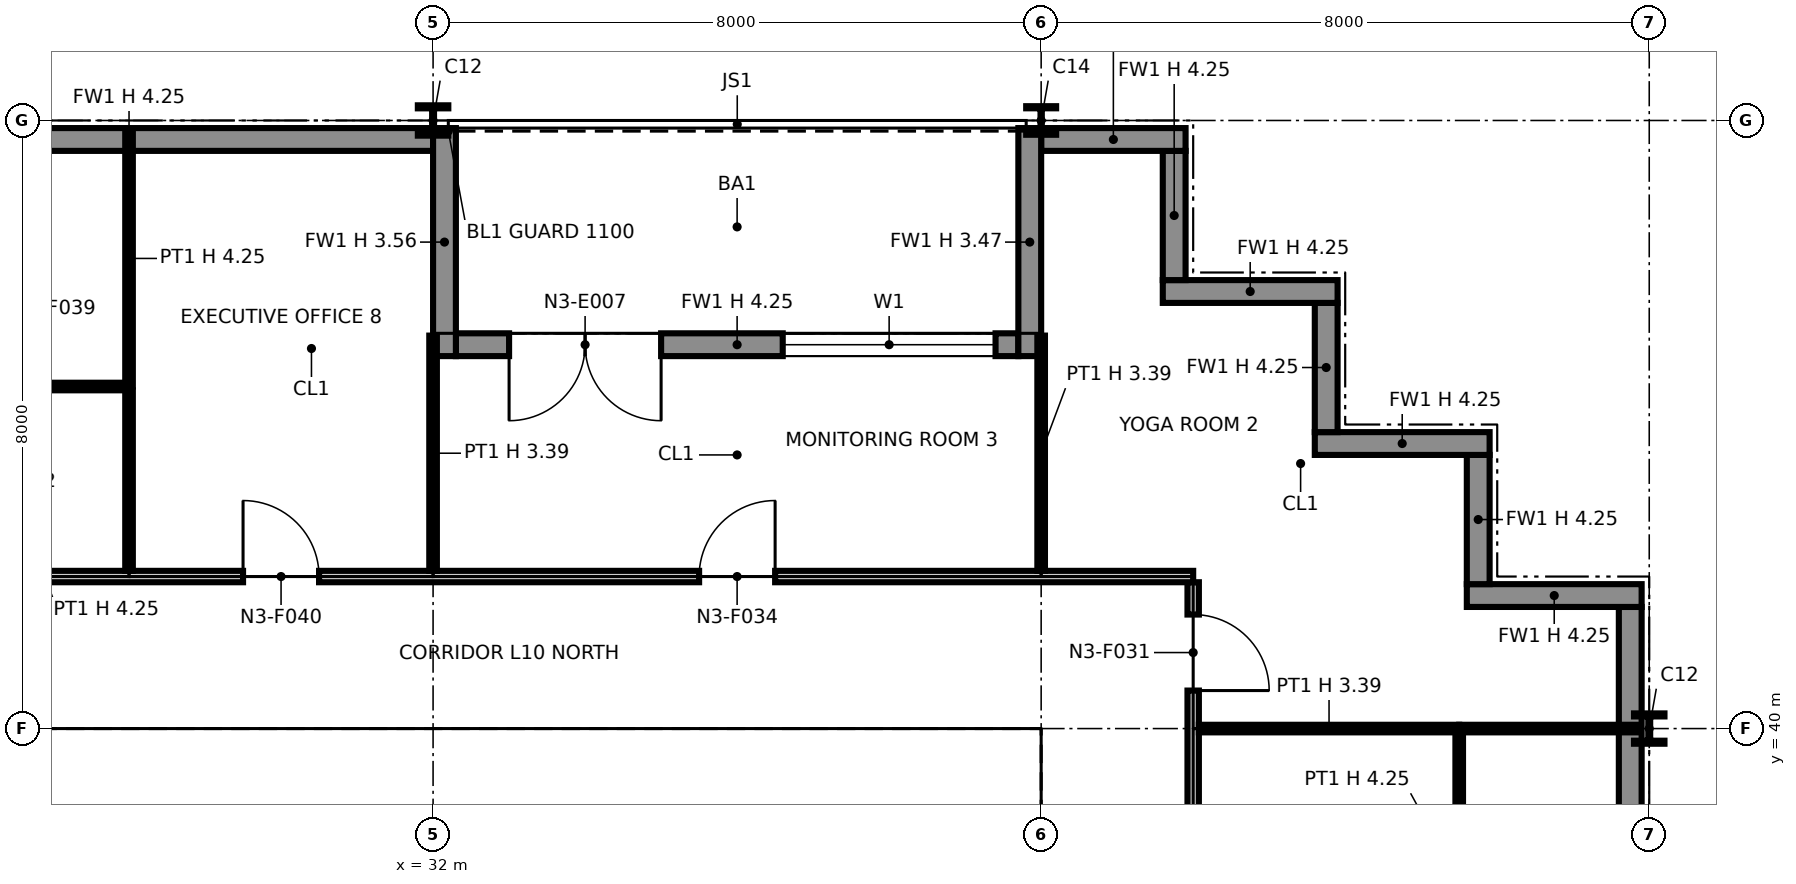
"""IFC4 building model, lengths in metres.
Left out: names, types, materials, properties, quantities, classifications, styles, units other than length and angle.
Written with IfcOpenShell. Run it as: python <this file> out.ifc"""

import sys

from ifc_helpers import new_model, si_unit, direction, frame, frame_2d, origin, origin_2d, place, context, subcontext, project, spatial, polyline, rectangle, i_section, outline, extrude, element, fill, save


model = new_model("IFC4")
c1 = context("Model", 3, precision=1e-05, world=origin(), true_north=direction((0.0, 1.0)))
c2 = subcontext(c1, "Body", "Model", "MODEL_VIEW")
j1 = project(units=[si_unit("LENGTHUNIT", "METRE"), si_unit("PLANEANGLEUNIT", "RADIAN")], contexts=[c1])
p1 = place(None, origin())
s1 = spatial("IfcSite", under=j1, at=p1, CompositionType="ELEMENT")
p2 = place(p1, origin())
s2 = spatial("IfcBuilding", under=s1, at=p2, CompositionType="ELEMENT")
p3 = place(p2, frame((0.0, 0.0, 61.2)))
s3 = spatial("IfcBuildingStorey", under=s2, at=p3, CompositionType="ELEMENT", Elevation=61.2)
p4 = place(p3, frame((32.0, 40.0, 0.0), z_axis=(0.0, 0.0, 1.0), x_axis=(1.0, 0.0, 0.0)))
e1 = element("IfcColumn", 1, at=p4, inside=s3, PredefinedType="COLUMN", context=c2, shape_type="SweptSolid", body=[
    extrude(i_section(OverallWidth=0.371, OverallDepth=0.361, WebThickness=0.012, FlangeThickness=0.02, at=origin_2d()), origin(), (0.0, 0.0, 1.0), 4.25),
])
p5 = place(p3, frame((32.0, 48.0, 0.0), z_axis=(0.0, 0.0, 1.0), x_axis=(1.0, 0.0, 0.0)))
e2 = element("IfcColumn", 2, at=p5, inside=s3, PredefinedType="COLUMN", context=c2, shape_type="SweptSolid", body=[
    extrude(i_section(OverallWidth=0.401, OverallDepth=0.399, WebThickness=0.025, FlangeThickness=0.04, at=origin_2d()), origin(), (0.0, 0.0, 1.0), 4.25),
])
p6 = place(p3, frame((40.0, 40.0, 0.0), z_axis=(0.0, 0.0, 1.0), x_axis=(1.0, 0.0, 0.0)))
e3 = element("IfcColumn", 3, at=p6, inside=s3, PredefinedType="COLUMN", context=c2, shape_type="SweptSolid", body=[
    extrude(i_section(OverallWidth=0.371, OverallDepth=0.361, WebThickness=0.012, FlangeThickness=0.02, at=origin_2d()), origin(), (0.0, 0.0, 1.0), 4.25),
])
p7 = place(p3, frame((40.0, 48.0, 0.0), z_axis=(0.0, 0.0, 1.0), x_axis=(1.0, 0.0, 0.0)))
e4 = element("IfcColumn", 4, at=p7, inside=s3, PredefinedType="COLUMN", context=c2, shape_type="SweptSolid", body=[
    extrude(i_section(OverallWidth=0.394, OverallDepth=0.376, WebThickness=0.017, FlangeThickness=0.028, at=origin_2d()), origin(), (0.0, 0.0, 1.0), 4.25),
])
p8 = place(p3, frame((48.0, 40.0, 0.0), z_axis=(0.0, 0.0, 1.0), x_axis=(1.0, 0.0, 0.0)))
e5 = element("IfcColumn", 5, at=p8, inside=s3, PredefinedType="COLUMN", context=c2, shape_type="SweptSolid", body=[
    extrude(i_section(OverallWidth=0.401, OverallDepth=0.399, WebThickness=0.025, FlangeThickness=0.04, at=origin_2d()), origin(), (0.0, 0.0, 1.0), 4.25),
])
p9 = place(p3, frame((47.75, 32.0, 0.0), z_axis=(0.0, 0.0, 1.0), x_axis=(0.0, 1.0, 0.0)))
e6 = element("IfcWall", 6, at=p9, inside=s3, PredefinedType="SOLIDWALL", context=c2, shape_type="SweptSolid", body=[
    extrude(rectangle(XDim=9.6, YDim=0.3, at=frame_2d((4.8, 0.0))), origin(), (0.0, 0.0, 1.0), 4.25),
])
p10 = place(p3, frame((47.9, 41.75, 0.0), z_axis=(0.0, 0.0, 1.0), x_axis=(-1.0, 0.0, 0.0)))
e7 = element("IfcWall", 7, at=p10, inside=s3, PredefinedType="SOLIDWALL", context=c2, shape_type="SweptSolid", body=[
    extrude(rectangle(XDim=2.3, YDim=0.3, at=frame_2d((1.15, 0.0))), origin(), (0.0, 0.0, 1.0), 4.25),
])
p11 = place(p3, frame((45.75, 41.9, 0.0), z_axis=(0.0, 0.0, 1.0), x_axis=(0.0, 1.0, 0.0)))
e8 = element("IfcWall", 8, at=p11, inside=s3, PredefinedType="SOLIDWALL", context=c2, shape_type="SweptSolid", body=[
    extrude(rectangle(XDim=1.7, YDim=0.3, at=frame_2d((0.85, 0.0))), origin(), (0.0, 0.0, 1.0), 4.25),
])
p12 = place(p3, frame((45.9, 43.75, 0.0), z_axis=(0.0, 0.0, 1.0), x_axis=(-1.0, 0.0, 0.0)))
e9 = element("IfcWall", 9, at=p12, inside=s3, PredefinedType="SOLIDWALL", context=c2, shape_type="SweptSolid", body=[
    extrude(rectangle(XDim=2.3, YDim=0.3, at=frame_2d((1.15, 0.0))), origin(), (0.0, 0.0, 1.0), 4.25),
])
p13 = place(p3, frame((43.75, 43.9, 0.0), z_axis=(0.0, 0.0, 1.0), x_axis=(0.0, 1.0, 0.0)))
e10 = element("IfcWall", 10, at=p13, inside=s3, PredefinedType="SOLIDWALL", context=c2, shape_type="SweptSolid", body=[
    extrude(rectangle(XDim=1.7, YDim=0.3, at=frame_2d((0.85, 0.0))), origin(), (0.0, 0.0, 1.0), 4.25),
])
p14 = place(p3, frame((43.9, 45.75, 0.0), z_axis=(0.0, 0.0, 1.0), x_axis=(-1.0, 0.0, 0.0)))
e11 = element("IfcWall", 11, at=p14, inside=s3, PredefinedType="SOLIDWALL", context=c2, shape_type="SweptSolid", body=[
    extrude(rectangle(XDim=2.3, YDim=0.3, at=frame_2d((1.15, 0.0))), origin(), (0.0, 0.0, 1.0), 4.25),
])
p15 = place(p3, frame((41.75, 45.9, 0.0), z_axis=(0.0, 0.0, 1.0), x_axis=(0.0, 1.0, 0.0)))
e12 = element("IfcWall", 12, at=p15, inside=s3, PredefinedType="SOLIDWALL", context=c2, shape_type="SweptSolid", body=[
    extrude(rectangle(XDim=1.7, YDim=0.3, at=frame_2d((0.85, 0.0))), origin(), (0.0, 0.0, 1.0), 4.25),
])
p16 = place(p3, frame((41.9, 47.75, 0.0), z_axis=(0.0, 0.0, 1.0), x_axis=(-1.0, 0.0, 0.0)))
e13 = element("IfcWall", 13, at=p16, inside=s3, PredefinedType="SOLIDWALL", context=c2, shape_type="SweptSolid", body=[
    extrude(rectangle(XDim=1.9, YDim=0.3, at=frame_2d((0.95, 0.0))), origin(), (0.0, 0.0, 1.0), 4.25),
])
p17 = place(p3, frame((39.7, 45.05, 0.0), z_axis=(0.0, 0.0, 1.0), x_axis=(-1.0, 0.0, 0.0)))
e14 = element("IfcWall", 14, at=p17, inside=s3, PredefinedType="SOLIDWALL", context=c2, shape_type="SweptSolid", body=[
    extrude(rectangle(XDim=7.4, YDim=0.3, at=frame_2d((3.7, 0.0))), origin(), (0.0, 0.0, 1.0), 4.25),
])
p18 = place(p17, frame((0.3, 0.0, 0.9)))
e15 = element("IfcOpeningElement", 15, at=p18, cuts=e14, PredefinedType="OPENING", context=c2, shape_type="SweptSolid", body=[
    extrude(rectangle(XDim=2.8, YDim=2.2, at=frame_2d((1.4, 1.1))), frame((0.0, 0.16, 0.0), z_axis=(0.0, -1.0, 0.0), x_axis=(1.0, 0.0, 0.0)), (0.0, 0.0, 1.0), 0.32),
])
p19 = place(p17, frame((4.7, 0.0, 0.0)))
e16 = element("IfcOpeningElement", 16, at=p19, cuts=e14, PredefinedType="OPENING", context=c2, shape_type="SweptSolid", body=[
    extrude(rectangle(XDim=2.0, YDim=2.4, at=frame_2d((1.0, 1.2))), frame((0.0, 0.16, 0.0), z_axis=(0.0, -1.0, 0.0), x_axis=(1.0, 0.0, 0.0)), (0.0, 0.0, 1.0), 0.32),
])
p20 = place(p3, frame((39.85, 47.9, 0.0), z_axis=(0.0, 0.0, 1.0), x_axis=(0.0, -1.0, 0.0)))
e17 = element("IfcWall", 17, at=p20, inside=s3, PredefinedType="SOLIDWALL", context=c2, shape_type="SweptSolid", body=[
    extrude(rectangle(XDim=3.0, YDim=0.3, at=frame_2d((1.5, 0.0))), origin(), (0.0, 0.0, 1.0), 3.469),
])
p21 = place(p3, frame((32.15, 47.9, 0.0), z_axis=(0.0, 0.0, 1.0), x_axis=(0.0, -1.0, 0.0)))
e18 = element("IfcWall", 18, at=p21, inside=s3, PredefinedType="SOLIDWALL", context=c2, shape_type="SweptSolid", body=[
    extrude(rectangle(XDim=3.0, YDim=0.3, at=frame_2d((1.5, 0.0))), origin(), (0.0, 0.0, 1.0), 3.556),
])
p22 = place(p3, frame((32.0, 47.75, 0.0), z_axis=(0.0, 0.0, 1.0), x_axis=(-1.0, 0.0, 0.0)))
e19 = element("IfcWall", 19, at=p22, inside=s3, PredefinedType="SOLIDWALL", context=c2, shape_type="SweptSolid", body=[
    extrude(rectangle(XDim=8.0, YDim=0.3, at=frame_2d((4.0, 0.0))), origin(), (0.0, 0.0, 1.0), 4.25),
])
p23 = place(p3, frame((24.65, 39.25, 0.0), z_axis=(0.0, 0.0, 1.0), x_axis=(1.0, 0.0, 0.0)))
e20 = element("IfcWall", 20, at=p23, inside=s3, PredefinedType="PARTITIONING", context=c2, shape_type="SweptSolid", body=[
    extrude(outline(polyline([(0.0, 0.0), (14.7, 0.0), (14.7, 4.25), (7.469, 4.25), (7.469, 3.632), (7.231, 3.632), (7.23, 4.25), (0.0, 4.25), (0.0, 0.0)])), frame((0.0, 0.1, 0.0), z_axis=(0.0, -1.0, 0.0), x_axis=(1.0, 0.0, 0.0)), (0.0, 0.0, 1.0), 0.2),
])
for number, where, z_axis, x_axis in (
    (21, (27.2, 36.4, 0.0), (0.0, 0.0, 1.0), (0.0, 1.0, 0.0)),
    (22, (29.5, 36.4, 0.0), (0.0, 0.0, 1.0), (0.0, 1.0, 0.0)),
):
    element("IfcWall", number, at=place(p3, frame(where, z_axis=z_axis, x_axis=x_axis)), inside=s3, PredefinedType="PARTITIONING", context=c2, shape_type="SweptSolid", body=[
        extrude(rectangle(XDim=2.75, YDim=0.2, at=frame_2d((1.375, 0.0))), origin(), (0.0, 0.0, 1.0), 4.25),
    ])
p24 = place(p3, frame((32.0, 32.85, 0.0), z_axis=(0.0, 0.0, 1.0), x_axis=(0.0, 1.0, 0.0)))
e23 = element("IfcWall", 23, at=p24, inside=s3, PredefinedType="PARTITIONING", context=c2, shape_type="SweptSolid", body=[
    extrude(rectangle(XDim=6.3, YDim=0.6, at=frame_2d((3.15, 0.0))), origin(), (0.0, 0.0, 1.0), 3.632),
])
for number, where, z_axis, x_axis in (
    (24, (35.6, 32.85, 0.0), (0.0, 0.0, 1.0), (0.0, 1.0, 0.0)),
    (25, (39.25, 32.85, 0.0), (0.0, 0.0, 1.0), (0.0, 1.0, 0.0)),
):
    element("IfcWall", number, at=place(p3, frame(where, z_axis=z_axis, x_axis=x_axis)), inside=s3, PredefinedType="PARTITIONING", context=c2, shape_type="SweptSolid", body=[
        extrude(rectangle(XDim=6.3, YDim=0.2, at=frame_2d((3.15, 0.0))), origin(), (0.0, 0.0, 1.0), 4.25),
    ])
p25 = place(p3, frame((42.0, 16.0, 0.0), z_axis=(0.0, 0.0, 1.0), x_axis=(0.0, 1.0, 0.0)))
e26 = element("IfcWall", 26, at=p25, inside=s3, PredefinedType="PARTITIONING", context=c2, shape_type="SweptSolid", body=[
    extrude(outline(polyline([(0.0, 0.0), (25.925, 0.0), (25.925, 4.25), (24.3, 4.25), (24.298, 3.391), (23.702, 3.391), (23.7, 4.25), (20.3, 4.25), (20.298, 3.391), (19.702, 3.391), (19.7, 4.25), (16.3, 4.25), (16.298, 3.391), (15.702, 3.391), (15.7, 4.25), (12.3, 4.25), (12.298, 3.391), (11.702, 3.391), (11.7, 4.25), (8.3, 4.25), (8.298, 3.391), (7.702, 3.391), (7.7, 4.25), (4.3, 4.25), (4.298, 3.391), (3.702, 3.391), (3.7, 4.25), (0.0, 4.25), (0.0, 0.0)])), frame((0.0, 0.075, 0.0), z_axis=(0.0, -1.0, 0.0), x_axis=(1.0, 0.0, 0.0)), (0.0, 0.0, 1.0), 0.15),
])
p26 = place(p25, frame((2.5, 0.0, 0.0), z_axis=(0.0, 0.0, 1.0), x_axis=(-1.0, 0.0, 0.0)))
e27 = element("IfcOpeningElement", 27, at=p26, cuts=e26, PredefinedType="OPENING", context=c2, shape_type="SweptSolid", body=[
    extrude(rectangle(XDim=1.0, YDim=2.1, at=frame_2d((0.5, 1.05))), frame((0.0, 0.085, 0.0), z_axis=(0.0, -1.0, 0.0), x_axis=(1.0, 0.0, 0.0)), (0.0, 0.0, 1.0), 0.17),
])
p27 = place(p25, frame((6.5, 0.0, 0.0), z_axis=(0.0, 0.0, 1.0), x_axis=(-1.0, 0.0, 0.0)))
e28 = element("IfcOpeningElement", 28, at=p27, cuts=e26, PredefinedType="OPENING", context=c2, shape_type="SweptSolid", body=[
    extrude(rectangle(XDim=1.0, YDim=2.1, at=frame_2d((0.5, 1.05))), frame((0.0, 0.085, 0.0), z_axis=(0.0, -1.0, 0.0), x_axis=(1.0, 0.0, 0.0)), (0.0, 0.0, 1.0), 0.17),
])
p28 = place(p25, frame((9.3, 0.0, 0.0), z_axis=(0.0, 0.0, 1.0), x_axis=(-1.0, 0.0, 0.0)))
e29 = element("IfcOpeningElement", 29, at=p28, cuts=e26, PredefinedType="OPENING", context=c2, shape_type="SweptSolid", body=[
    extrude(rectangle(XDim=1.0, YDim=2.1, at=frame_2d((0.5, 1.05))), frame((0.0, 0.085, 0.0), z_axis=(0.0, -1.0, 0.0), x_axis=(1.0, 0.0, 0.0)), (0.0, 0.0, 1.0), 0.17),
])
p29 = place(p25, frame((14.5, 0.0, 0.0), z_axis=(0.0, 0.0, 1.0), x_axis=(-1.0, 0.0, 0.0)))
e30 = element("IfcOpeningElement", 30, at=p29, cuts=e26, PredefinedType="OPENING", context=c2, shape_type="SweptSolid", body=[
    extrude(rectangle(XDim=1.0, YDim=2.1, at=frame_2d((0.5, 1.05))), frame((0.0, 0.085, 0.0), z_axis=(0.0, -1.0, 0.0), x_axis=(1.0, 0.0, 0.0)), (0.0, 0.0, 1.0), 0.17),
])
p30 = place(p25, frame((18.5, 0.0, 0.0), z_axis=(0.0, 0.0, 1.0), x_axis=(-1.0, 0.0, 0.0)))
e31 = element("IfcOpeningElement", 31, at=p30, cuts=e26, PredefinedType="OPENING", context=c2, shape_type="SweptSolid", body=[
    extrude(rectangle(XDim=1.0, YDim=2.1, at=frame_2d((0.5, 1.05))), frame((0.0, 0.085, 0.0), z_axis=(0.0, -1.0, 0.0), x_axis=(1.0, 0.0, 0.0)), (0.0, 0.0, 1.0), 0.17),
])
p31 = place(p25, frame((22.5, 0.0, 0.0), z_axis=(0.0, 0.0, 1.0), x_axis=(-1.0, 0.0, 0.0)))
e32 = element("IfcOpeningElement", 32, at=p31, cuts=e26, PredefinedType="OPENING", context=c2, shape_type="SweptSolid", body=[
    extrude(rectangle(XDim=1.0, YDim=2.1, at=frame_2d((0.5, 1.05))), frame((0.0, 0.085, 0.0), z_axis=(0.0, -1.0, 0.0), x_axis=(1.0, 0.0, 0.0)), (0.0, 0.0, 1.0), 0.17),
])
p32 = place(p25, frame((25.5, 0.0, 0.0), z_axis=(0.0, 0.0, 1.0), x_axis=(-1.0, 0.0, 0.0)))
e33 = element("IfcOpeningElement", 33, at=p32, cuts=e26, PredefinedType="OPENING", context=c2, shape_type="SweptSolid", body=[
    extrude(rectangle(XDim=1.0, YDim=2.1, at=frame_2d((0.5, 1.05))), frame((0.0, 0.085, 0.0), z_axis=(0.0, -1.0, 0.0), x_axis=(1.0, 0.0, 0.0)), (0.0, 0.0, 1.0), 0.17),
])
p33 = place(p3, frame((45.5, 36.0, 0.0), z_axis=(0.0, 0.0, 1.0), x_axis=(0.0, 1.0, 0.0)))
e34 = element("IfcWall", 34, at=p33, inside=s3, PredefinedType="PARTITIONING", context=c2, shape_type="SweptSolid", body=[
    extrude(rectangle(XDim=3.95, YDim=0.1, at=frame_2d((1.975, 0.0))), origin(), (0.0, 0.0, 1.0), 4.25),
])
p34 = place(p33, frame((2.5, 0.0, 0.0), z_axis=(0.0, 0.0, 1.0), x_axis=(-1.0, 0.0, 0.0)))
e35 = element("IfcOpeningElement", 35, at=p34, cuts=e34, PredefinedType="OPENING", context=c2, shape_type="SweptSolid", body=[
    extrude(rectangle(XDim=1.0, YDim=2.1, at=frame_2d((0.5, 1.05))), frame((0.0, 0.06, 0.0), z_axis=(0.0, -1.0, 0.0), x_axis=(1.0, 0.0, 0.0)), (0.0, 0.0, 1.0), 0.12),
])
p35 = place(p3, frame((42.075, 40.0, 0.0), z_axis=(0.0, 0.0, 1.0), x_axis=(1.0, 0.0, 0.0)))
e36 = element("IfcWall", 36, at=p35, inside=s3, PredefinedType="PARTITIONING", context=c2, shape_type="SweptSolid", body=[
    extrude(rectangle(XDim=3.425, YDim=0.1, at=frame_2d((1.712, 0.0))), origin(), (0.0, 0.0, 1.0), 3.391),
])
p36 = place(p3, frame((45.5, 40.0, 0.0), z_axis=(0.0, 0.0, 1.0), x_axis=(1.0, 0.0, 0.0)))
e37 = element("IfcWall", 37, at=p36, inside=s3, PredefinedType="PARTITIONING", context=c2, shape_type="SweptSolid", body=[
    extrude(rectangle(XDim=2.37, YDim=0.1, at=frame_2d((1.185, 0.0))), origin(), (0.0, 0.0, 1.0), 3.391),
])
p37 = place(p3, frame((8.05, 42.0, 0.0), z_axis=(0.0, 0.0, 1.0), x_axis=(1.0, 0.0, 0.0)))
e38 = element("IfcWall", 38, at=p37, inside=s3, PredefinedType="PARTITIONING", context=c2, shape_type="SweptSolid", body=[
    extrude(rectangle(XDim=33.95, YDim=0.15, at=frame_2d((16.975, 0.0))), origin(), (0.0, 0.0, 1.0), 4.25),
])
p38 = place(p37, frame((9.45, 0.0, 0.0)))
e39 = element("IfcOpeningElement", 39, at=p38, cuts=e38, PredefinedType="OPENING", context=c2, shape_type="SweptSolid", body=[
    extrude(rectangle(XDim=1.0, YDim=2.1, at=frame_2d((0.5, 1.05))), frame((0.0, 0.085, 0.0), z_axis=(0.0, -1.0, 0.0), x_axis=(1.0, 0.0, 0.0)), (0.0, 0.0, 1.0), 0.17),
])
p39 = place(p37, frame((13.45, 0.0, 0.0)))
e40 = element("IfcOpeningElement", 40, at=p39, cuts=e38, PredefinedType="OPENING", context=c2, shape_type="SweptSolid", body=[
    extrude(rectangle(XDim=1.0, YDim=2.1, at=frame_2d((0.5, 1.05))), frame((0.0, 0.085, 0.0), z_axis=(0.0, -1.0, 0.0), x_axis=(1.0, 0.0, 0.0)), (0.0, 0.0, 1.0), 0.17),
])
p40 = place(p37, frame((27.45, 0.0, 0.0)))
e41 = element("IfcOpeningElement", 41, at=p40, cuts=e38, PredefinedType="OPENING", context=c2, shape_type="SweptSolid", body=[
    extrude(rectangle(XDim=1.0, YDim=2.1, at=frame_2d((0.5, 1.05))), frame((0.0, 0.085, 0.0), z_axis=(0.0, -1.0, 0.0), x_axis=(1.0, 0.0, 0.0)), (0.0, 0.0, 1.0), 0.17),
])
p41 = place(p37, frame((1.45, 0.0, 0.0)))
e42 = element("IfcOpeningElement", 42, at=p41, cuts=e38, PredefinedType="OPENING", context=c2, shape_type="SweptSolid", body=[
    extrude(rectangle(XDim=1.0, YDim=2.1, at=frame_2d((0.5, 1.05))), frame((0.0, 0.085, 0.0), z_axis=(0.0, -1.0, 0.0), x_axis=(1.0, 0.0, 0.0)), (0.0, 0.0, 1.0), 0.17),
])
p42 = place(p37, frame((5.45, 0.0, 0.0)))
e43 = element("IfcOpeningElement", 43, at=p42, cuts=e38, PredefinedType="OPENING", context=c2, shape_type="SweptSolid", body=[
    extrude(rectangle(XDim=1.0, YDim=2.1, at=frame_2d((0.5, 1.05))), frame((0.0, 0.085, 0.0), z_axis=(0.0, -1.0, 0.0), x_axis=(1.0, 0.0, 0.0)), (0.0, 0.0, 1.0), 0.17),
])
p43 = place(p37, frame((17.45, 0.0, 0.0)))
e44 = element("IfcOpeningElement", 44, at=p43, cuts=e38, PredefinedType="OPENING", context=c2, shape_type="SweptSolid", body=[
    extrude(rectangle(XDim=1.0, YDim=2.1, at=frame_2d((0.5, 1.05))), frame((0.0, 0.085, 0.0), z_axis=(0.0, -1.0, 0.0), x_axis=(1.0, 0.0, 0.0)), (0.0, 0.0, 1.0), 0.17),
])
p44 = place(p37, frame((21.45, 0.0, 0.0)))
e45 = element("IfcOpeningElement", 45, at=p44, cuts=e38, PredefinedType="OPENING", context=c2, shape_type="SweptSolid", body=[
    extrude(rectangle(XDim=1.0, YDim=2.1, at=frame_2d((0.5, 1.05))), frame((0.0, 0.085, 0.0), z_axis=(0.0, -1.0, 0.0), x_axis=(1.0, 0.0, 0.0)), (0.0, 0.0, 1.0), 0.17),
])
p45 = place(p3, frame((28.0, 42.075, 0.0), z_axis=(0.0, 0.0, 1.0), x_axis=(0.0, 1.0, 0.0)))
e46 = element("IfcWall", 46, at=p45, inside=s3, PredefinedType="PARTITIONING", context=c2, shape_type="SweptSolid", body=[
    extrude(rectangle(XDim=2.375, YDim=0.1, at=frame_2d((1.188, 0.0))), origin(), (0.0, 0.0, 1.0), 3.391),
])
for number, where, z_axis, x_axis in (
    (47, (32.0, 42.075, 0.0), (0.0, 0.0, 1.0), (0.0, 1.0, 0.0)),
    (48, (40.0, 42.075, 0.0), (0.0, 0.0, 1.0), (0.0, 1.0, 0.0)),
):
    element("IfcWall", number, at=place(p3, frame(where, z_axis=z_axis, x_axis=x_axis)), inside=s3, PredefinedType="PARTITIONING", context=c2, shape_type="SweptSolid", body=[
        extrude(rectangle(XDim=3.095, YDim=0.1, at=frame_2d((1.547, 0.0))), origin(), (0.0, 0.0, 1.0), 3.391),
    ])
p46 = place(p3, frame((24.05, 44.5, 0.0), z_axis=(0.0, 0.0, 1.0), x_axis=(1.0, 0.0, 0.0)))
e49 = element("IfcWall", 49, at=p46, inside=s3, PredefinedType="PARTITIONING", context=c2, shape_type="SweptSolid", body=[
    extrude(rectangle(XDim=3.9, YDim=0.1, at=frame_2d((1.95, 0.0))), origin(), (0.0, 0.0, 1.0), 4.25),
])
p47 = place(p46, frame((1.45, 0.0, 0.0)))
e50 = element("IfcOpeningElement", 50, at=p47, cuts=e49, PredefinedType="OPENING", context=c2, shape_type="SweptSolid", body=[
    extrude(rectangle(XDim=1.0, YDim=2.1, at=frame_2d((0.5, 1.05))), frame((0.0, 0.06, 0.0), z_axis=(0.0, -1.0, 0.0), x_axis=(1.0, 0.0, 0.0)), (0.0, 0.0, 1.0), 0.12),
])
p48 = place(p3, frame((28.0, 44.5, 0.0), z_axis=(0.0, 0.0, 1.0), x_axis=(0.0, 1.0, 0.0)))
e51 = element("IfcWall", 51, at=p48, inside=s3, PredefinedType="PARTITIONING", context=c2, shape_type="SweptSolid", body=[
    extrude(rectangle(XDim=3.37, YDim=0.1, at=frame_2d((1.685, 0.0))), origin(), (0.0, 0.0, 1.0), 4.25),
])
p49 = place(p18, origin())
e52 = element("IfcWindow", 52, at=p49, inside=s3, PartitioningType="SINGLE_PANEL", PredefinedType="WINDOW", context=c2, shape_type="SweptSolid", body=[
    extrude(rectangle(XDim=2.8, YDim=2.2, at=frame_2d((1.4, 1.1))), frame((0.0, 0.03, 0.0), z_axis=(0.0, -1.0, 0.0), x_axis=(1.0, 0.0, 0.0)), (0.0, 0.0, 1.0), 0.06),
])
fill(e15, e52)
p50 = place(p19, origin())
e53 = element("IfcDoor", 53, at=p50, inside=s3, OperationType="DOUBLE_DOOR_SINGLE_SWING", PredefinedType="DOOR", context=c2, shape_type="SweptSolid", body=[
    extrude(rectangle(XDim=2.0, YDim=2.4, at=frame_2d((1.0, 1.2))), frame((0.0, 0.025, 0.0), z_axis=(0.0, -1.0, 0.0), x_axis=(1.0, 0.0, 0.0)), (0.0, 0.0, 1.0), 0.05),
])
fill(e16, e53)
p51 = place(p32, origin())
e54 = element("IfcDoor", 54, at=p51, inside=s3, OperationType="SINGLE_SWING_RIGHT", PredefinedType="DOOR", context=c2, shape_type="SweptSolid", body=[
    extrude(rectangle(XDim=1.0, YDim=2.1, at=frame_2d((0.5, 1.05))), frame((0.0, 0.025, 0.0), z_axis=(0.0, -1.0, 0.0), x_axis=(1.0, 0.0, 0.0)), (0.0, 0.0, 1.0), 0.05),
])
fill(e33, e54)
p52 = place(p40, origin())
e55 = element("IfcDoor", 55, at=p52, inside=s3, OperationType="SINGLE_SWING_RIGHT", PredefinedType="DOOR", context=c2, shape_type="SweptSolid", body=[
    extrude(rectangle(XDim=1.0, YDim=2.1, at=frame_2d((0.5, 1.05))), frame((0.0, 0.025, 0.0), z_axis=(0.0, -1.0, 0.0), x_axis=(1.0, 0.0, 0.0)), (0.0, 0.0, 1.0), 0.05),
])
fill(e41, e55)
p53 = place(p44, origin())
e56 = element("IfcDoor", 56, at=p53, inside=s3, OperationType="SINGLE_SWING_LEFT", PredefinedType="DOOR", context=c2, shape_type="SweptSolid", body=[
    extrude(rectangle(XDim=1.0, YDim=2.1, at=frame_2d((0.5, 1.05))), frame((0.0, 0.025, 0.0), z_axis=(0.0, -1.0, 0.0), x_axis=(1.0, 0.0, 0.0)), (0.0, 0.0, 1.0), 0.05),
])
fill(e45, e56)
save(model, sys.argv[1])
